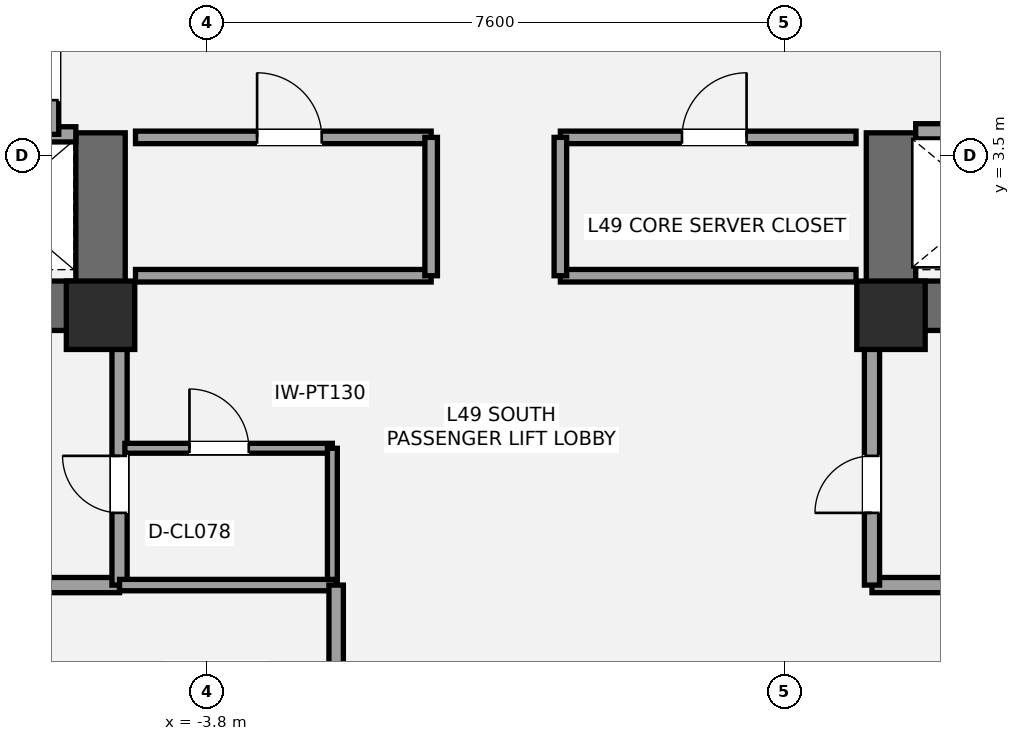
"""IFC4 building model, lengths in metres.
Left out: names, types, materials, properties, quantities, classifications, styles, units other than length and angle.
Written with IfcOpenShell. Run it as: python <this file> out.ifc"""

import sys

from ifc_helpers import new_model, si_unit, direction, frame, frame_2d, origin, origin_2d, place, context, subcontext, project, spatial, rectangle, extrude, element, fill, save


model = new_model("IFC4")
c1 = context("Model", 3, precision=1e-05, world=origin(), true_north=direction((0.0, 1.0)))
c2 = subcontext(c1, "Body", "Model", "MODEL_VIEW")
j1 = project(units=[si_unit("LENGTHUNIT", "METRE"), si_unit("PLANEANGLEUNIT", "RADIAN")], contexts=[c1])
p1 = place(None, origin())
s1 = spatial("IfcSite", under=j1, at=p1, CompositionType="ELEMENT")
p2 = place(p1, origin())
s2 = spatial("IfcBuilding", under=s1, at=p2, CompositionType="ELEMENT")
p3 = place(p2, frame((0.0, 0.0, 179.0)))
s3 = spatial("IfcBuildingStorey", under=s2, at=p3, CompositionType="ELEMENT", Elevation=179.0)
p4 = place(p3, frame((-4.875, 1.525, 0.0), z_axis=(0.0, 0.0, 1.0), x_axis=(-1.0, 0.0, 0.0)))
e1 = element("IfcWall", 1, at=p4, inside=s3, PredefinedType="SHEAR", context=c2, shape_type="SweptSolid", body=[
    extrude(rectangle(XDim=8.925, YDim=0.65, at=frame_2d((4.462, 0.0))), origin(), (0.0, 0.0, 1.0), 3.2),
])
p5 = place(p4, frame((5.425, 0.0, 0.0)))
e2 = element("IfcOpeningElement", 2, at=p5, cuts=e1, PredefinedType="OPENING", context=c2, shape_type="SweptSolid", body=[
    extrude(rectangle(XDim=1.05, YDim=2.15, at=frame_2d((0.525, 1.075))), frame((0.0, 0.335, 0.0), z_axis=(0.0, -1.0, 0.0), x_axis=(1.0, 0.0, 0.0)), (0.0, 0.0, 1.0), 0.67),
])
p6 = place(p4, frame((3.755, 0.0, 0.0)))
e3 = element("IfcOpeningElement", 3, at=p6, cuts=e1, PredefinedType="OPENING", context=c2, shape_type="SweptSolid", body=[
    extrude(rectangle(XDim=1.1, YDim=2.2, at=frame_2d((0.55, 1.1))), frame((0.0, 0.335, 0.0), z_axis=(0.0, -1.0, 0.0), x_axis=(1.0, 0.0, 0.0)), (0.0, 0.0, 1.0), 0.67),
])
p7 = place(p3, frame((-5.2, 1.2, 0.0), z_axis=(0.0, 0.0, 1.0), x_axis=(0.0, 1.0, 0.0)))
e4 = element("IfcWall", 4, at=p7, inside=s3, PredefinedType="SHEAR", context=c2, shape_type="SweptSolid", body=[
    extrude(rectangle(XDim=2.6, YDim=0.65, at=frame_2d((1.3, 0.0))), origin(), (0.0, 0.0, 1.0), 3.2),
])
p8 = place(p3, frame((13.8, 1.525, 0.0), z_axis=(0.0, 0.0, 1.0), x_axis=(-1.0, 0.0, 0.0)))
e5 = element("IfcWall", 5, at=p8, inside=s3, PredefinedType="SHEAR", context=c2, shape_type="SweptSolid", body=[
    extrude(rectangle(XDim=8.925, YDim=0.65, at=frame_2d((4.462, 0.0))), origin(), (0.0, 0.0, 1.0), 3.2),
])
p9 = place(p8, frame((2.45, 0.0, 0.0)))
e6 = element("IfcOpeningElement", 6, at=p9, cuts=e5, PredefinedType="OPENING", context=c2, shape_type="SweptSolid", body=[
    extrude(rectangle(XDim=1.05, YDim=2.15, at=frame_2d((0.525, 1.075))), frame((0.0, 0.335, 0.0), z_axis=(0.0, -1.0, 0.0), x_axis=(1.0, 0.0, 0.0)), (0.0, 0.0, 1.0), 0.67),
])
p10 = place(p8, frame((4.45, 0.0, 0.0)))
e7 = element("IfcOpeningElement", 7, at=p10, cuts=e5, PredefinedType="OPENING", context=c2, shape_type="SweptSolid", body=[
    extrude(rectangle(XDim=1.1, YDim=2.2, at=frame_2d((0.55, 1.1))), frame((0.0, 0.335, 0.0), z_axis=(0.0, -1.0, 0.0), x_axis=(1.0, 0.0, 0.0)), (0.0, 0.0, 1.0), 0.67),
])
p11 = place(p3, frame((5.2, 1.2, 0.0), z_axis=(0.0, 0.0, 1.0), x_axis=(0.0, 1.0, 0.0)))
e8 = element("IfcWall", 8, at=p11, inside=s3, PredefinedType="SHEAR", context=c2, shape_type="SweptSolid", body=[
    extrude(rectangle(XDim=2.6, YDim=0.65, at=frame_2d((1.3, 0.0))), origin(), (0.0, 0.0, 1.0), 3.2),
])
for number, where, z_axis, x_axis in (
    (9, (-5.2, 1.4, 0.0), (0.0, 0.0, 1.0), (1.0, 0.0, 0.0)),
    (10, (5.2, 1.4, 0.0), (0.0, 0.0, 1.0), (1.0, 0.0, 0.0)),
):
    element("IfcColumn", number, at=place(p3, frame(where, z_axis=z_axis, x_axis=x_axis)), inside=s3, PredefinedType="COLUMN", context=c2, shape_type="SweptSolid", body=[
        extrude(rectangle(XDim=0.9, YDim=0.9, at=origin_2d()), origin(), (0.0, 0.0, 1.0), 3.2),
    ])
p12 = place(p3, frame((-7.2, -2.15, 0.0), z_axis=(0.0, 0.0, 1.0), x_axis=(1.0, 0.0, 0.0)))
e11 = element("IfcWall", 11, at=p12, inside=s3, PredefinedType="SOLIDWALL", context=c2, shape_type="SweptSolid", body=[
    extrude(rectangle(XDim=2.25, YDim=0.2, at=frame_2d((1.125, 0.0))), origin(), (0.0, 0.0, 1.0), 3.02),
])
p13 = place(p3, frame((-4.95, -2.15, 0.0), z_axis=(0.0, 0.0, 1.0), x_axis=(0.0, 1.0, 0.0)))
e12 = element("IfcWall", 12, at=p13, inside=s3, PredefinedType="SOLIDWALL", context=c2, shape_type="SweptSolid", body=[
    extrude(rectangle(XDim=3.4, YDim=0.2, at=frame_2d((1.7, 0.0))), origin(), (0.0, 0.0, 1.0), 2.473),
])
p14 = place(p13, frame((0.95, 0.0, 0.0)))
e13 = element("IfcOpeningElement", 13, at=p14, cuts=e12, PredefinedType="OPENING", context=c2, shape_type="SweptSolid", body=[
    extrude(rectangle(XDim=0.75, YDim=2.1, at=frame_2d((0.375, 1.05))), frame((0.0, 0.11, 0.0), z_axis=(0.0, -1.0, 0.0), x_axis=(1.0, 0.0, 0.0)), (0.0, 0.0, 1.0), 0.22),
])
p15 = place(p3, frame((4.95, -2.15, 0.0), z_axis=(0.0, 0.0, 1.0), x_axis=(1.0, 0.0, 0.0)))
e14 = element("IfcWall", 14, at=p15, inside=s3, PredefinedType="SOLIDWALL", context=c2, shape_type="SweptSolid", body=[
    extrude(rectangle(XDim=2.25, YDim=0.2, at=frame_2d((1.125, 0.0))), origin(), (0.0, 0.0, 1.0), 3.02),
])
p16 = place(p3, frame((4.95, -2.15, 0.0), z_axis=(0.0, 0.0, 1.0), x_axis=(0.0, 1.0, 0.0)))
e15 = element("IfcWall", 15, at=p16, inside=s3, PredefinedType="SOLIDWALL", context=c2, shape_type="SweptSolid", body=[
    extrude(rectangle(XDim=3.4, YDim=0.2, at=frame_2d((1.7, 0.0))), origin(), (0.0, 0.0, 1.0), 2.473),
])
p17 = place(p16, frame((0.95, 0.0, 0.0)))
e16 = element("IfcOpeningElement", 16, at=p17, cuts=e15, PredefinedType="OPENING", context=c2, shape_type="SweptSolid", body=[
    extrude(rectangle(XDim=0.75, YDim=2.1, at=frame_2d((0.375, 1.05))), frame((0.0, 0.11, 0.0), z_axis=(0.0, -1.0, 0.0), x_axis=(1.0, 0.0, 0.0)), (0.0, 0.0, 1.0), 0.22),
])
p18 = place(p3, frame((-4.88, -0.35, 0.0), z_axis=(0.0, 0.0, 1.0), x_axis=(1.0, 0.0, 0.0)))
e17 = element("IfcWall", 17, at=p18, inside=s3, PredefinedType="PARTITIONING", context=c2, shape_type="SweptSolid", body=[
    extrude(rectangle(XDim=2.73, YDim=0.13, at=frame_2d((1.365, 0.0))), origin(), (0.0, 0.0, 1.0), 3.02),
])
p19 = place(p18, frame((0.85, 0.0, 0.0)))
e18 = element("IfcOpeningElement", 18, at=p19, cuts=e17, PredefinedType="OPENING", context=c2, shape_type="SweptSolid", body=[
    extrude(rectangle(XDim=0.78, YDim=2.1, at=frame_2d((0.39, 1.05))), frame((0.0, 0.075, 0.0), z_axis=(0.0, -1.0, 0.0), x_axis=(1.0, 0.0, 0.0)), (0.0, 0.0, 1.0), 0.15),
])
p20 = place(p3, frame((-2.15, -2.15, 0.0), z_axis=(0.0, 0.0, 1.0), x_axis=(0.0, 1.0, 0.0)))
e19 = element("IfcWall", 19, at=p20, inside=s3, PredefinedType="PARTITIONING", context=c2, shape_type="SweptSolid", body=[
    extrude(rectangle(XDim=1.8, YDim=0.13, at=frame_2d((0.9, 0.0))), origin(), (0.0, 0.0, 1.0), 3.02),
])
p21 = place(p3, frame((-9.78, 3.78, 0.0), z_axis=(0.0, 0.0, 1.0), x_axis=(1.0, 0.0, 0.0)))
e20 = element("IfcWall", 20, at=p21, inside=s3, PredefinedType="SOLIDWALL", context=c2, shape_type="SweptSolid", body=[
    extrude(rectangle(XDim=4.255, YDim=0.2, at=frame_2d((2.127, 0.0))), origin(), (0.0, 0.0, 1.0), 3.02),
])
p22 = place(p3, frame((-5.85, 3.78, 0.0), z_axis=(0.0, 0.0, 1.0), x_axis=(0.0, 1.0, 0.0)))
e21 = element("IfcWall", 21, at=p22, inside=s3, PredefinedType="SOLIDWALL", context=c2, shape_type="SweptSolid", body=[
    extrude(rectangle(XDim=1.69, YDim=0.2, at=frame_2d((0.845, 0.0))), origin(), (0.0, 0.0, 1.0), 3.02),
])
p23 = place(p22, frame((0.45, 0.0, 0.0)))
e22 = element("IfcOpeningElement", 22, at=p23, cuts=e21, PredefinedType="OPENING", context=c2, shape_type="SweptSolid", body=[
    extrude(rectangle(XDim=0.75, YDim=2.1, at=frame_2d((0.375, 1.05))), frame((0.0, 0.11, 0.0), z_axis=(0.0, -1.0, 0.0), x_axis=(1.0, 0.0, 0.0)), (0.0, 0.0, 1.0), 0.22),
])
p24 = place(p3, frame((5.525, 3.82, 0.0), z_axis=(0.0, 0.0, 1.0), x_axis=(1.0, 0.0, 0.0)))
e23 = element("IfcWall", 23, at=p24, inside=s3, PredefinedType="SOLIDWALL", context=c2, shape_type="SweptSolid", body=[
    extrude(rectangle(XDim=4.255, YDim=0.2, at=frame_2d((2.127, 0.0))), origin(), (0.0, 0.0, 1.0), 3.02),
])
p25 = place(p24, frame((0.65, 0.0, 0.0)))
e24 = element("IfcOpeningElement", 24, at=p25, cuts=e23, PredefinedType="OPENING", context=c2, shape_type="SweptSolid", body=[
    extrude(rectangle(XDim=1.2, YDim=2.2, at=frame_2d((0.6, 1.1))), frame((0.0, 0.11, 0.0), z_axis=(0.0, -1.0, 0.0), x_axis=(1.0, 0.0, 0.0)), (0.0, 0.0, 1.0), 0.22),
])
p26 = place(p3, frame((-4.74, 1.92, 0.0), z_axis=(0.0, 0.0, 1.0), x_axis=(1.0, 0.0, 0.0)))
e25 = element("IfcWall", 25, at=p26, inside=s3, PredefinedType="PARTITIONING", context=c2, shape_type="SweptSolid", body=[
    extrude(rectangle(XDim=3.89, YDim=0.165, at=frame_2d((1.945, 0.0))), origin(), (0.0, 0.0, 1.0), 2.16),
])
p27 = place(p3, frame((-4.74, 3.74, 0.0), z_axis=(0.0, 0.0, 1.0), x_axis=(1.0, 0.0, 0.0)))
e26 = element("IfcWall", 26, at=p27, inside=s3, PredefinedType="PARTITIONING", context=c2, shape_type="SweptSolid", body=[
    extrude(rectangle(XDim=3.89, YDim=0.165, at=frame_2d((1.945, 0.0))), origin(), (0.0, 0.0, 1.0), 3.02),
])
p28 = place(p27, frame((1.6, 0.0, 0.0)))
e27 = element("IfcOpeningElement", 27, at=p28, cuts=e26, PredefinedType="OPENING", context=c2, shape_type="SweptSolid", body=[
    extrude(rectangle(XDim=0.85, YDim=2.1, at=frame_2d((0.425, 1.05))), frame((0.0, 0.093, 0.0), z_axis=(0.0, -1.0, 0.0), x_axis=(1.0, 0.0, 0.0)), (0.0, 0.0, 1.0), 0.185),
])
p29 = place(p3, frame((-0.85, 1.92, 0.0), z_axis=(0.0, 0.0, 1.0), x_axis=(0.0, 1.0, 0.0)))
e28 = element("IfcWall", 28, at=p29, inside=s3, PredefinedType="PARTITIONING", context=c2, shape_type="SweptSolid", body=[
    extrude(rectangle(XDim=1.82, YDim=0.165, at=frame_2d((0.91, 0.0))), origin(), (0.0, 0.0, 1.0), 3.02),
])
p30 = place(p3, frame((0.85, 1.92, 0.0), z_axis=(0.0, 0.0, 1.0), x_axis=(1.0, 0.0, 0.0)))
e29 = element("IfcWall", 29, at=p30, inside=s3, PredefinedType="PARTITIONING", context=c2, shape_type="SweptSolid", body=[
    extrude(rectangle(XDim=3.89, YDim=0.165, at=frame_2d((1.945, 0.0))), origin(), (0.0, 0.0, 1.0), 2.16),
])
p31 = place(p3, frame((0.85, 3.74, 0.0), z_axis=(0.0, 0.0, 1.0), x_axis=(1.0, 0.0, 0.0)))
e30 = element("IfcWall", 30, at=p31, inside=s3, PredefinedType="PARTITIONING", context=c2, shape_type="SweptSolid", body=[
    extrude(rectangle(XDim=3.89, YDim=0.165, at=frame_2d((1.945, 0.0))), origin(), (0.0, 0.0, 1.0), 3.02),
])
p32 = place(p31, frame((1.6, 0.0, 0.0)))
e31 = element("IfcOpeningElement", 31, at=p32, cuts=e30, PredefinedType="OPENING", context=c2, shape_type="SweptSolid", body=[
    extrude(rectangle(XDim=0.85, YDim=2.1, at=frame_2d((0.425, 1.05))), frame((0.0, 0.093, 0.0), z_axis=(0.0, -1.0, 0.0), x_axis=(1.0, 0.0, 0.0)), (0.0, 0.0, 1.0), 0.185),
])
p33 = place(p3, frame((0.85, 1.92, 0.0), z_axis=(0.0, 0.0, 1.0), x_axis=(0.0, 1.0, 0.0)))
e32 = element("IfcWall", 32, at=p33, inside=s3, PredefinedType="PARTITIONING", context=c2, shape_type="SweptSolid", body=[
    extrude(rectangle(XDim=1.82, YDim=0.165, at=frame_2d((0.91, 0.0))), origin(), (0.0, 0.0, 1.0), 3.02),
])
p34 = place(p3, frame((-4.95, -2.15, 0.0), z_axis=(0.0, 0.0, 1.0), x_axis=(1.0, 0.0, 0.0)))
e33 = element("IfcWall", 33, at=p34, inside=s3, PredefinedType="PLUMBINGWALL", context=c2, shape_type="SweptSolid", body=[
    extrude(rectangle(XDim=2.85, YDim=0.15, at=frame_2d((1.425, 0.0))), origin(), (0.0, 0.0, 1.0), 2.473),
])
p35 = place(p3, frame((-2.1, -4.05, 0.0), z_axis=(0.0, 0.0, 1.0), x_axis=(0.0, 1.0, 0.0)))
e34 = element("IfcWall", 34, at=p35, inside=s3, PredefinedType="PLUMBINGWALL", context=c2, shape_type="SweptSolid", body=[
    extrude(rectangle(XDim=1.9, YDim=0.19, at=frame_2d((0.95, 0.0))), origin(), (0.0, 0.0, 1.0), 3.02),
])
p36 = place(p14, origin())
e35 = element("IfcDoor", 35, at=p36, inside=s3, OperationType="SINGLE_SWING_RIGHT", PredefinedType="DOOR", context=c2, shape_type="SweptSolid", body=[
    extrude(rectangle(XDim=0.75, YDim=2.1, at=frame_2d((0.375, 1.05))), frame((0.0, 0.025, 0.0), z_axis=(0.0, -1.0, 0.0), x_axis=(1.0, 0.0, 0.0)), (0.0, 0.0, 1.0), 0.05),
])
fill(e13, e35)
p37 = place(p17, origin())
e36 = element("IfcDoor", 36, at=p37, inside=s3, OperationType="SINGLE_SWING_LEFT", PredefinedType="DOOR", context=c2, shape_type="SweptSolid", body=[
    extrude(rectangle(XDim=0.75, YDim=2.1, at=frame_2d((0.375, 1.05))), frame((0.0, 0.025, 0.0), z_axis=(0.0, -1.0, 0.0), x_axis=(1.0, 0.0, 0.0)), (0.0, 0.0, 1.0), 0.05),
])
fill(e16, e36)
p38 = place(p19, origin())
e37 = element("IfcDoor", 37, at=p38, inside=s3, OperationType="SINGLE_SWING_LEFT", PredefinedType="DOOR", context=c2, shape_type="SweptSolid", body=[
    extrude(rectangle(XDim=0.78, YDim=2.1, at=frame_2d((0.39, 1.05))), frame((0.0, 0.025, 0.0), z_axis=(0.0, -1.0, 0.0), x_axis=(1.0, 0.0, 0.0)), (0.0, 0.0, 1.0), 0.05),
])
fill(e18, e37)
p39 = place(p23, origin())
e38 = element("IfcDoor", 38, at=p39, inside=s3, OperationType="SINGLE_SWING_RIGHT", PredefinedType="DOOR", context=c2, shape_type="SweptSolid", body=[
    extrude(rectangle(XDim=0.75, YDim=2.1, at=frame_2d((0.375, 1.05))), frame((0.0, 0.025, 0.0), z_axis=(0.0, -1.0, 0.0), x_axis=(1.0, 0.0, 0.0)), (0.0, 0.0, 1.0), 0.05),
])
fill(e22, e38)
p40 = place(p28, origin())
e39 = element("IfcDoor", 39, at=p40, inside=s3, OperationType="SINGLE_SWING_LEFT", PredefinedType="DOOR", context=c2, shape_type="SweptSolid", body=[
    extrude(rectangle(XDim=0.85, YDim=2.1, at=frame_2d((0.425, 1.05))), frame((0.0, 0.025, 0.0), z_axis=(0.0, -1.0, 0.0), x_axis=(1.0, 0.0, 0.0)), (0.0, 0.0, 1.0), 0.05),
])
fill(e27, e39)
p41 = place(p32, origin())
e40 = element("IfcDoor", 40, at=p41, inside=s3, OperationType="SINGLE_SWING_RIGHT", PredefinedType="DOOR", context=c2, shape_type="SweptSolid", body=[
    extrude(rectangle(XDim=0.85, YDim=2.1, at=frame_2d((0.425, 1.05))), frame((0.0, 0.025, 0.0), z_axis=(0.0, -1.0, 0.0), x_axis=(1.0, 0.0, 0.0)), (0.0, 0.0, 1.0), 0.05),
])
fill(e31, e40)
save(model, sys.argv[1])
